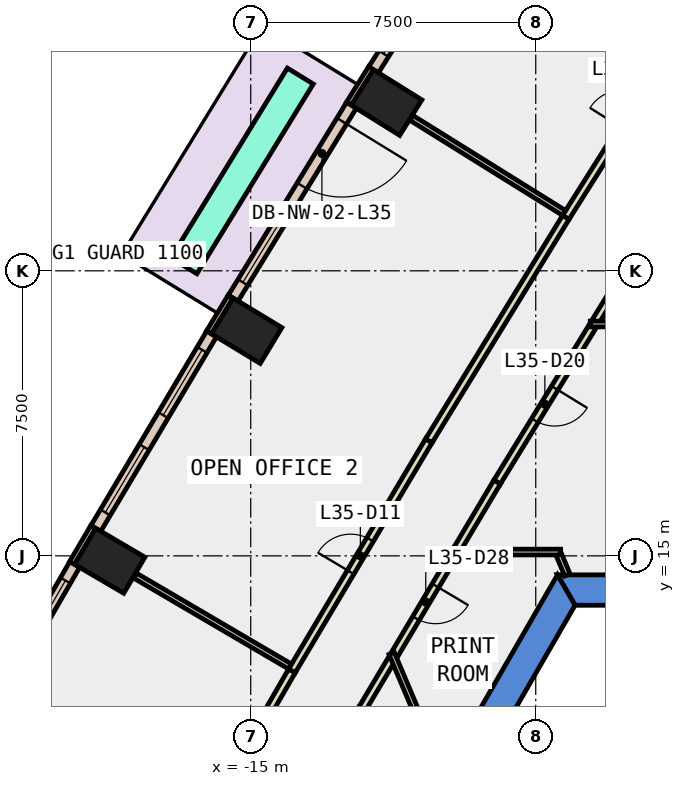
"""IFC4 building model, lengths in metres.
Left out: names, types, materials, properties, quantities, classifications, styles, units other than length and angle.
Written with IfcOpenShell. Run it as: python <this file> out.ifc"""

import sys

from ifc_helpers import new_model, si_unit, direction, frame, frame_2d, origin, origin_2d, place, context, subcontext, project, spatial, polyline, rectangle, outline, extrude, element, fill, save


model = new_model("IFC4")
c1 = context("Model", 3, precision=1e-05, world=origin(), true_north=direction((0.0, 1.0)))
c2 = subcontext(c1, "Body", "Model", "MODEL_VIEW")
j1 = project(units=[si_unit("LENGTHUNIT", "METRE"), si_unit("PLANEANGLEUNIT", "RADIAN")], contexts=[c1])
p1 = place(None, origin())
s1 = spatial("IfcSite", under=j1, at=p1, CompositionType="ELEMENT")
p2 = place(p1, origin())
s2 = spatial("IfcBuilding", under=s1, at=p2, CompositionType="ELEMENT")
p3 = place(p2, frame((0.0, 0.0, 159.2)))
s3 = spatial("IfcBuildingStorey", under=s2, at=p3, CompositionType="ELEMENT", Elevation=159.2)
for number, where, z_axis, x_axis in (
    (1, (-11.425, 26.928, -0.4), (0.0, 0.0, 1.0), (0.53, 0.848, 0.0)),
    (2, (-15.107, 20.923, -0.4), (0.0, 0.0, 1.0), (0.518, 0.855, 0.0)),
    (3, (-18.71, 14.87, -0.4), (0.0, 0.0, 1.0), (0.506, 0.863, 0.0)),
):
    element("IfcColumn", number, at=place(p3, frame(where, z_axis=z_axis, x_axis=x_axis)), inside=s3, PredefinedType="COLUMN", context=c2, shape_type="SweptSolid", body=[
        extrude(rectangle(XDim=1.1, YDim=1.5, at=origin_2d()), origin(), (0.0, 0.0, 1.0), 4.2),
    ])
p4 = place(p3, frame((0.0, 0.0, -0.4)))
e4 = element("IfcWall", 4, at=p4, inside=s3, PredefinedType="SHEAR", context=c2, shape_type="SweptSolid", body=[
    extrude(outline(polyline([(6.928, 14.5), (-6.928, 14.5), (-6.466, 13.7), (6.466, 13.7), (6.928, 14.5)])), origin(), (0.0, 0.0, 1.0), 4.2),
])
p5 = place(p3, frame((0.0, 0.0, -0.4)))
e5 = element("IfcWall", 5, at=p5, inside=s3, PredefinedType="SHEAR", context=c2, shape_type="SweptSolid", body=[
    extrude(outline(polyline([(-12.267, 5.252), (-11.575, 4.852), (-6.466, 13.7), (-6.928, 14.5), (-12.267, 5.252)])), origin(), (0.0, 0.0, 1.0), 4.2),
])
for number, where, z_axis, x_axis in (
    (6, (-11.833, 27.832, 0.0), (0.0, 0.0, 1.0), (-0.53, -0.848, 0.0)),
    (7, (-15.528, 21.821, 0.0), (0.0, 0.0, 1.0), (-0.518, -0.855, 0.0)),
):
    element("IfcWall", number, at=place(p3, frame(where, z_axis=z_axis, x_axis=x_axis)), inside=s3, PredefinedType="STANDARD", context=c2, shape_type="SweptSolid", body=[
        extrude(rectangle(XDim=1.1, YDim=0.15, at=frame_2d((0.55, 0.0))), origin(), (0.0, 0.0, 1.0), 3.8),
    ])
p6 = place(p3, frame((-19.143, 15.761, 0.0), z_axis=(0.0, 0.0, 1.0), x_axis=(-0.506505715302, -0.862236603472, 0.0)))
e8 = element("IfcWall", 8, at=p6, inside=s3, PredefinedType="STANDARD", context=c2, shape_type="SweptSolid", body=[
    extrude(rectangle(XDim=1.099, YDim=0.15, at=frame_2d((0.55, 0.0))), origin(), (0.0, 0.0, 1.0), 3.8),
])
p7 = place(p3, frame((-8.566, 32.855, 0.0), z_axis=(0.0, 0.0, 1.0), x_axis=(-0.534262775953, -0.845318452556, 0.0)))
e9 = element("IfcWall", 9, at=p7, inside=s3, PredefinedType="STANDARD", context=c2, shape_type="SweptSolid", body=[
    extrude(rectangle(XDim=5.992, YDim=0.3, at=frame_2d((2.996, 0.0))), origin(), (0.0, 0.0, 1.0), 3.8),
])
p8 = place(p7, frame((0.498, 0.0, 0.9)))
e10 = element("IfcOpeningElement", 10, at=p8, cuts=e9, PredefinedType="OPENING", context=c2, shape_type="SweptSolid", body=[
    extrude(rectangle(XDim=2.0, YDim=2.6, at=frame_2d((1.0, 1.3))), frame((0.0, 0.16, 0.0), z_axis=(0.0, -1.0, 0.0), x_axis=(1.0, 0.0, 0.0)), (0.0, 0.0, 1.0), 0.32),
])
p9 = place(p7, frame((3.494, 0.0, 0.9)))
e11 = element("IfcOpeningElement", 11, at=p9, cuts=e9, PredefinedType="OPENING", context=c2, shape_type="SweptSolid", body=[
    extrude(rectangle(XDim=2.0, YDim=2.6, at=frame_2d((1.0, 1.3))), frame((0.0, 0.16, 0.0), z_axis=(0.0, -1.0, 0.0), x_axis=(1.0, 0.0, 0.0)), (0.0, 0.0, 1.0), 0.32),
])
p10 = place(p3, frame((-12.348, 26.858, 0.0), z_axis=(0.0, 0.0, 1.0), x_axis=(-0.522704272908, -0.852514072074, 0.0)))
e12 = element("IfcWall", 12, at=p10, inside=s3, PredefinedType="STANDARD", context=c2, shape_type="SweptSolid", body=[
    extrude(rectangle(XDim=5.958, YDim=0.3, at=frame_2d((2.979, 0.0))), origin(), (0.0, 0.0, 1.0), 3.8),
])
p11 = place(p10, frame((0.489, 0.0, 0.0)))
e13 = element("IfcOpeningElement", 13, at=p11, cuts=e12, PredefinedType="OPENING", context=c2, shape_type="SweptSolid", body=[
    extrude(rectangle(XDim=2.0, YDim=2.4, at=frame_2d((1.0, 1.2))), frame((0.0, 0.16, 0.0), z_axis=(0.0, -1.0, 0.0), x_axis=(1.0, 0.0, 0.0)), (0.0, 0.0, 1.0), 0.32),
])
p12 = place(p10, frame((3.468, 0.0, 0.9)))
e14 = element("IfcOpeningElement", 14, at=p12, cuts=e12, PredefinedType="OPENING", context=c2, shape_type="SweptSolid", body=[
    extrude(rectangle(XDim=2.0, YDim=2.6, at=frame_2d((1.0, 1.3))), frame((0.0, 0.16, 0.0), z_axis=(0.0, -1.0, 0.0), x_axis=(1.0, 0.0, 0.0)), (0.0, 0.0, 1.0), 0.32),
])
p13 = place(p3, frame((-16.029, 20.84, 0.0), z_axis=(0.0, 0.0, 1.0), x_axis=(-0.511455040009, -0.859310038374, 0.0)))
e15 = element("IfcWall", 15, at=p13, inside=s3, PredefinedType="STANDARD", context=c2, shape_type="SweptSolid", body=[
    extrude(rectangle(XDim=5.957, YDim=0.3, at=frame_2d((2.979, 0.0))), origin(), (0.0, 0.0, 1.0), 3.8),
])
p14 = place(p13, frame((0.489, 0.0, 0.9)))
e16 = element("IfcOpeningElement", 16, at=p14, cuts=e15, PredefinedType="OPENING", context=c2, shape_type="SweptSolid", body=[
    extrude(rectangle(XDim=2.0, YDim=2.6, at=frame_2d((1.0, 1.3))), frame((0.0, 0.16, 0.0), z_axis=(0.0, -1.0, 0.0), x_axis=(1.0, 0.0, 0.0)), (0.0, 0.0, 1.0), 0.32),
])
p15 = place(p13, frame((3.468, 0.0, 0.9)))
e17 = element("IfcOpeningElement", 17, at=p15, cuts=e15, PredefinedType="OPENING", context=c2, shape_type="SweptSolid", body=[
    extrude(rectangle(XDim=2.0, YDim=2.6, at=frame_2d((1.0, 1.3))), frame((0.0, 0.16, 0.0), z_axis=(0.0, -1.0, 0.0), x_axis=(1.0, 0.0, 0.0)), (0.0, 0.0, 1.0), 0.32),
])
p16 = place(p3, frame((-19.631, 14.774, 0.0), z_axis=(0.0, 0.0, 1.0), x_axis=(-0.500061823953, -0.865989706766, 0.0)))
e18 = element("IfcWall", 18, at=p16, inside=s3, PredefinedType="STANDARD", context=c2, shape_type="SweptSolid", body=[
    extrude(rectangle(XDim=5.957, YDim=0.3, at=frame_2d((2.979, 0.0))), origin(), (0.0, 0.0, 1.0), 3.8),
])
p17 = place(p16, frame((0.489, 0.0, 0.9)))
e19 = element("IfcOpeningElement", 19, at=p17, cuts=e18, PredefinedType="OPENING", context=c2, shape_type="SweptSolid", body=[
    extrude(rectangle(XDim=2.0, YDim=2.6, at=frame_2d((1.0, 1.3))), frame((0.0, 0.16, 0.0), z_axis=(0.0, -1.0, 0.0), x_axis=(1.0, 0.0, 0.0)), (0.0, 0.0, 1.0), 0.32),
])
p18 = place(p16, frame((3.468, 0.0, 0.9)))
e20 = element("IfcOpeningElement", 20, at=p18, cuts=e18, PredefinedType="OPENING", context=c2, shape_type="SweptSolid", body=[
    extrude(rectangle(XDim=2.0, YDim=2.6, at=frame_2d((1.0, 1.3))), frame((0.0, 0.16, 0.0), z_axis=(0.0, -1.0, 0.0), x_axis=(1.0, 0.0, 0.0)), (0.0, 0.0, 1.0), 0.32),
])
p19 = place(p3, frame((-13.695, 27.625, 0.0), z_axis=(0.0, 0.0, 1.0), x_axis=(-0.52278978303, -0.852461637119, 0.0)))
e21 = element("IfcWall", 21, at=p19, inside=s3, PredefinedType="STANDARD", context=c2, shape_type="SweptSolid", body=[
    extrude(rectangle(XDim=5.857, YDim=0.8, at=frame_2d((2.929, 0.0))), origin(), (0.0, 0.0, 1.0), 0.8),
])
p20 = place(p3, frame((-9.574, 15.164, 0.0), z_axis=(0.0, 0.0, 1.0), x_axis=(-0.511482522046, -0.859293680671, 0.0)))
e22 = element("IfcWall", 22, at=p20, inside=s3, PredefinedType="PARTITIONING", context=c2, shape_type="SweptSolid", body=[
    extrude(rectangle(XDim=3.208, YDim=0.2, at=frame_2d((1.604, 0.0))), origin(), (0.0, 0.0, 1.0), 3.8),
])
p21 = place(p20, frame((1.104, 0.0, 0.0)))
e23 = element("IfcOpeningElement", 23, at=p21, cuts=e22, PredefinedType="OPENING", context=c2, shape_type="SweptSolid", body=[
    extrude(rectangle(XDim=1.0, YDim=2.1, at=frame_2d((0.5, 1.05))), frame((0.0, 0.11, 0.0), z_axis=(0.0, -1.0, 0.0), x_axis=(1.0, 0.0, 0.0)), (0.0, 0.0, 1.0), 0.22),
])
p22 = place(p3, frame((-11.291, 12.278, 0.0), z_axis=(0.0, 0.0, 1.0), x_axis=(-0.511628198266, -0.859206952217, 0.0)))
e24 = element("IfcWall", 24, at=p22, inside=s3, PredefinedType="PARTITIONING", context=c2, shape_type="SweptSolid", body=[
    extrude(rectangle(XDim=1.517, YDim=0.2, at=frame_2d((0.758, 0.0))), origin(), (0.0, 0.0, 1.0), 3.8),
])
p23 = place(p3, frame((-6.005, 21.036, 0.0), z_axis=(0.0, 0.0, 1.0), x_axis=(-0.522865983217, -0.852414901086, 0.0)))
e25 = element("IfcWall", 25, at=p23, inside=s3, PredefinedType="PARTITIONING", context=c2, shape_type="SweptSolid", body=[
    extrude(rectangle(XDim=4.803, YDim=0.2, at=frame_2d((2.401, 0.0))), origin(), (0.0, 0.0, 1.0), 3.8),
])
p24 = place(p23, frame((1.901, 0.0, 0.0)))
e26 = element("IfcOpeningElement", 26, at=p24, cuts=e25, PredefinedType="OPENING", context=c2, shape_type="SweptSolid", body=[
    extrude(rectangle(XDim=1.0, YDim=2.1, at=frame_2d((0.5, 1.05))), frame((0.0, 0.11, 0.0), z_axis=(0.0, -1.0, 0.0), x_axis=(1.0, 0.0, 0.0)), (0.0, 0.0, 1.0), 0.22),
])
p25 = place(p3, frame((-8.516, 16.942, 0.0), z_axis=(0.0, 0.0, 1.0), x_axis=(-0.511351070319, -0.859371911854, 0.0)))
e27 = element("IfcWall", 27, at=p25, inside=s3, PredefinedType="PARTITIONING", context=c2, shape_type="SweptSolid", body=[
    extrude(rectangle(XDim=2.069, YDim=0.2, at=frame_2d((1.034, 0.0))), origin(), (0.0, 0.0, 1.0), 3.8),
])
p26 = place(p3, frame((-4.887, 22.86, 0.0), z_axis=(0.0, 0.0, 1.0), x_axis=(-0.522754838565, -0.852483066552, 0.0)))
e28 = element("IfcWall", 28, at=p26, inside=s3, PredefinedType="PARTITIONING", context=c2, shape_type="SweptSolid", body=[
    extrude(rectangle(XDim=1.99, YDim=0.2, at=frame_2d((0.995, 0.0))), origin(), (0.0, 0.0, 1.0), 3.8),
])
p27 = place(p3, frame((-6.71, 23.906, 0.0), z_axis=(0.0, 0.0, 1.0), x_axis=(0.534211624298, 0.845350779538, 0.0)))
e29 = element("IfcWall", 29, at=p27, inside=s3, PredefinedType="PARTITIONING", context=c2, shape_type="SweptSolid", body=[
    extrude(rectangle(XDim=6.553, YDim=0.2, at=frame_2d((3.277, 0.0))), origin(), (0.0, 0.0, 1.0), 3.8),
])
p28 = place(p27, frame((2.777, 0.0, 0.0)))
e30 = element("IfcOpeningElement", 30, at=p28, cuts=e29, PredefinedType="OPENING", context=c2, shape_type="SweptSolid", body=[
    extrude(rectangle(XDim=1.0, YDim=2.1, at=frame_2d((0.5, 1.05))), frame((0.0, 0.11, 0.0), z_axis=(0.0, -1.0, 0.0), x_axis=(1.0, 0.0, 0.0)), (0.0, 0.0, 1.0), 0.22),
])
p29 = place(p3, frame((-13.917, 11.973, 0.0), z_axis=(0.0, 0.0, 1.0), x_axis=(0.511455840413, 0.859309561978, 0.0)))
e31 = element("IfcWall", 31, at=p29, inside=s3, PredefinedType="PARTITIONING", context=c2, shape_type="SweptSolid", body=[
    extrude(rectangle(XDim=7.047, YDim=0.2, at=frame_2d((3.523, 0.0))), origin(), (0.0, 0.0, 1.0), 3.8),
])
p30 = place(p29, frame((3.023, 0.0, 0.0)))
e32 = element("IfcOpeningElement", 32, at=p30, cuts=e31, PredefinedType="OPENING", context=c2, shape_type="SweptSolid", body=[
    extrude(rectangle(XDim=1.0, YDim=2.1, at=frame_2d((0.5, 1.05))), frame((0.0, 0.11, 0.0), z_axis=(0.0, -1.0, 0.0), x_axis=(1.0, 0.0, 0.0)), (0.0, 0.0, 1.0), 0.22),
])
p31 = place(p3, frame((-10.313, 18.028, 0.0), z_axis=(0.0, 0.0, 1.0), x_axis=(0.522772968793, 0.85247194857, 0.0)))
e33 = element("IfcWall", 33, at=p31, inside=s3, PredefinedType="PARTITIONING", context=c2, shape_type="SweptSolid", body=[
    extrude(rectangle(XDim=6.894, YDim=0.2, at=frame_2d((3.447, 0.0))), origin(), (0.0, 0.0, 1.0), 3.8),
])
p32 = place(p3, frame((-17.402, 5.936, 0.0), z_axis=(0.0, 0.0, 1.0), x_axis=(0.500135788517, 0.865946992052, 0.0)))
e34 = element("IfcWall", 34, at=p32, inside=s3, PredefinedType="PARTITIONING", context=c2, shape_type="SweptSolid", body=[
    extrude(rectangle(XDim=6.97, YDim=0.2, at=frame_2d((3.485, 0.0))), origin(), (0.0, 0.0, 1.0), 3.8),
])
p33 = place(p32, frame((3.06, 0.0, 0.0)))
e35 = element("IfcOpeningElement", 35, at=p33, cuts=e34, PredefinedType="OPENING", context=c2, shape_type="SweptSolid", body=[
    extrude(rectangle(XDim=1.0, YDim=2.1, at=frame_2d((0.5, 1.05))), frame((0.0, 0.11, 0.0), z_axis=(0.0, -1.0, 0.0), x_axis=(1.0, 0.0, 0.0)), (0.0, 0.0, 1.0), 0.22),
])
p34 = place(p3, frame((-9.952, 9.262, 0.0), z_axis=(0.0, 0.0, 1.0), x_axis=(-0.38905491579, 0.921214563769, 0.0)))
e36 = element("IfcWall", 36, at=p34, inside=s3, PredefinedType="PARTITIONING", context=c2, shape_type="SweptSolid", body=[
    extrude(rectangle(XDim=3.445, YDim=0.15, at=frame_2d((1.722, 0.0))), origin(), (0.0, 0.0, 1.0), 3.8),
])
p35 = place(p3, frame((-6.846, 15.1, 0.0), z_axis=(0.0, 0.0, 1.0), x_axis=(-1.0, 0.0, 0.0)))
e37 = element("IfcWall", 37, at=p35, inside=s3, PredefinedType="PARTITIONING", context=c2, shape_type="SweptSolid", body=[
    extrude(rectangle(XDim=2.766, YDim=0.15, at=frame_2d((1.383, 0.0))), origin(), (0.0, 0.0, 1.0), 3.8),
])
p36 = place(p3, frame((-6.668, 14.5, 0.0), z_axis=(0.0, 0.0, 1.0), x_axis=(-0.388852201086, 0.921300149631, 0.0)))
e38 = element("IfcWall", 38, at=p36, inside=s3, PredefinedType="PARTITIONING", context=c2, shape_type="SweptSolid", body=[
    extrude(rectangle(XDim=0.576, YDim=0.15, at=frame_2d((0.288, 0.0))), origin(), (0.0, 0.0, 1.0), 3.8),
])
p37 = place(p3, frame((-6.066, 21.1, 0.0), z_axis=(0.0, 0.0, 1.0), x_axis=(1.0, 0.0, 0.0)))
e39 = element("IfcWall", 39, at=p37, inside=s3, PredefinedType="PARTITIONING", context=c2, shape_type="SweptSolid", body=[
    extrude(rectangle(XDim=5.666, YDim=0.15, at=frame_2d((2.833, 0.0))), origin(), (0.0, 0.0, 1.0), 3.8),
])
p38 = place(p3, frame((-6.755, 24.023, 0.0), z_axis=(0.0, 0.0, 1.0), x_axis=(-0.848896034983, 0.528559856392, 0.0)))
e40 = element("IfcWall", 40, at=p38, inside=s3, PredefinedType="PARTITIONING", context=c2, shape_type="SweptSolid", body=[
    extrude(rectangle(XDim=4.73, YDim=0.15, at=frame_2d((2.365, 0.0))), origin(), (0.0, 0.0, 1.0), 3.8),
])
p39 = place(p3, frame((-13.965, 12.088, 0.0), z_axis=(0.0, 0.0, 1.0), x_axis=(-0.862617990649, 0.50585591052, 0.0)))
e41 = element("IfcWall", 41, at=p39, inside=s3, PredefinedType="PARTITIONING", context=c2, shape_type="SweptSolid", body=[
    extrude(rectangle(XDim=4.731, YDim=0.15, at=frame_2d((2.365, 0.0))), origin(), (0.0, 0.0, 1.0), 3.8),
])
p40 = place(p9, origin())
e42 = element("IfcWindow", 42, at=p40, inside=s3, PartitioningType="SINGLE_PANEL", PredefinedType="WINDOW", context=c2, shape_type="SweptSolid", body=[
    extrude(rectangle(XDim=2.0, YDim=2.6, at=frame_2d((1.0, 1.3))), frame((0.0, 0.03, 0.0), z_axis=(0.0, -1.0, 0.0), x_axis=(1.0, 0.0, 0.0)), (0.0, 0.0, 1.0), 0.06),
])
fill(e11, e42)
p41 = place(p11, origin())
e43 = element("IfcDoor", 43, at=p41, inside=s3, OperationType="SLIDING_TO_LEFT", PredefinedType="DOOR", context=c2, shape_type="SweptSolid", body=[
    extrude(rectangle(XDim=2.0, YDim=2.4, at=frame_2d((1.0, 1.2))), frame((0.0, 0.025, 0.0), z_axis=(0.0, -1.0, 0.0), x_axis=(1.0, 0.0, 0.0)), (0.0, 0.0, 1.0), 0.05),
])
fill(e13, e43)
p42 = place(p12, origin())
e44 = element("IfcWindow", 44, at=p42, inside=s3, PartitioningType="SINGLE_PANEL", PredefinedType="WINDOW", context=c2, shape_type="SweptSolid", body=[
    extrude(rectangle(XDim=2.0, YDim=2.6, at=frame_2d((1.0, 1.3))), frame((0.0, 0.03, 0.0), z_axis=(0.0, -1.0, 0.0), x_axis=(1.0, 0.0, 0.0)), (0.0, 0.0, 1.0), 0.06),
])
fill(e14, e44)
p43 = place(p14, origin())
e45 = element("IfcWindow", 45, at=p43, inside=s3, PartitioningType="SINGLE_PANEL", PredefinedType="WINDOW", context=c2, shape_type="SweptSolid", body=[
    extrude(rectangle(XDim=2.0, YDim=2.6, at=frame_2d((1.0, 1.3))), frame((0.0, 0.03, 0.0), z_axis=(0.0, -1.0, 0.0), x_axis=(1.0, 0.0, 0.0)), (0.0, 0.0, 1.0), 0.06),
])
fill(e16, e45)
p44 = place(p15, origin())
e46 = element("IfcWindow", 46, at=p44, inside=s3, PartitioningType="SINGLE_PANEL", PredefinedType="WINDOW", context=c2, shape_type="SweptSolid", body=[
    extrude(rectangle(XDim=2.0, YDim=2.6, at=frame_2d((1.0, 1.3))), frame((0.0, 0.03, 0.0), z_axis=(0.0, -1.0, 0.0), x_axis=(1.0, 0.0, 0.0)), (0.0, 0.0, 1.0), 0.06),
])
fill(e17, e46)
p45 = place(p17, origin())
e47 = element("IfcWindow", 47, at=p45, inside=s3, PartitioningType="SINGLE_PANEL", PredefinedType="WINDOW", context=c2, shape_type="SweptSolid", body=[
    extrude(rectangle(XDim=2.0, YDim=2.6, at=frame_2d((1.0, 1.3))), frame((0.0, 0.03, 0.0), z_axis=(0.0, -1.0, 0.0), x_axis=(1.0, 0.0, 0.0)), (0.0, 0.0, 1.0), 0.06),
])
fill(e19, e47)
p46 = place(p30, origin())
e48 = element("IfcDoor", 48, at=p46, inside=s3, OperationType="SINGLE_SWING_LEFT", PredefinedType="DOOR", context=c2, shape_type="SweptSolid", body=[
    extrude(rectangle(XDim=1.0, YDim=2.1, at=frame_2d((0.5, 1.05))), frame((0.0, 0.025, 0.0), z_axis=(0.0, -1.0, 0.0), x_axis=(1.0, 0.0, 0.0)), (0.0, 0.0, 1.0), 0.05),
])
fill(e32, e48)
p47 = place(p24, origin())
e49 = element("IfcDoor", 49, at=p47, inside=s3, OperationType="SINGLE_SWING_LEFT", PredefinedType="DOOR", context=c2, shape_type="SweptSolid", body=[
    extrude(rectangle(XDim=1.0, YDim=2.1, at=frame_2d((0.5, 1.05))), frame((0.0, 0.025, 0.0), z_axis=(0.0, -1.0, 0.0), x_axis=(1.0, 0.0, 0.0)), (0.0, 0.0, 1.0), 0.05),
])
fill(e26, e49)
p48 = place(p21, origin())
e50 = element("IfcDoor", 50, at=p48, inside=s3, OperationType="SINGLE_SWING_RIGHT", PredefinedType="DOOR", context=c2, shape_type="SweptSolid", body=[
    extrude(rectangle(XDim=1.0, YDim=2.1, at=frame_2d((0.5, 1.05))), frame((0.0, 0.025, 0.0), z_axis=(0.0, -1.0, 0.0), x_axis=(1.0, 0.0, 0.0)), (0.0, 0.0, 1.0), 0.05),
])
fill(e23, e50)
save(model, sys.argv[1])
